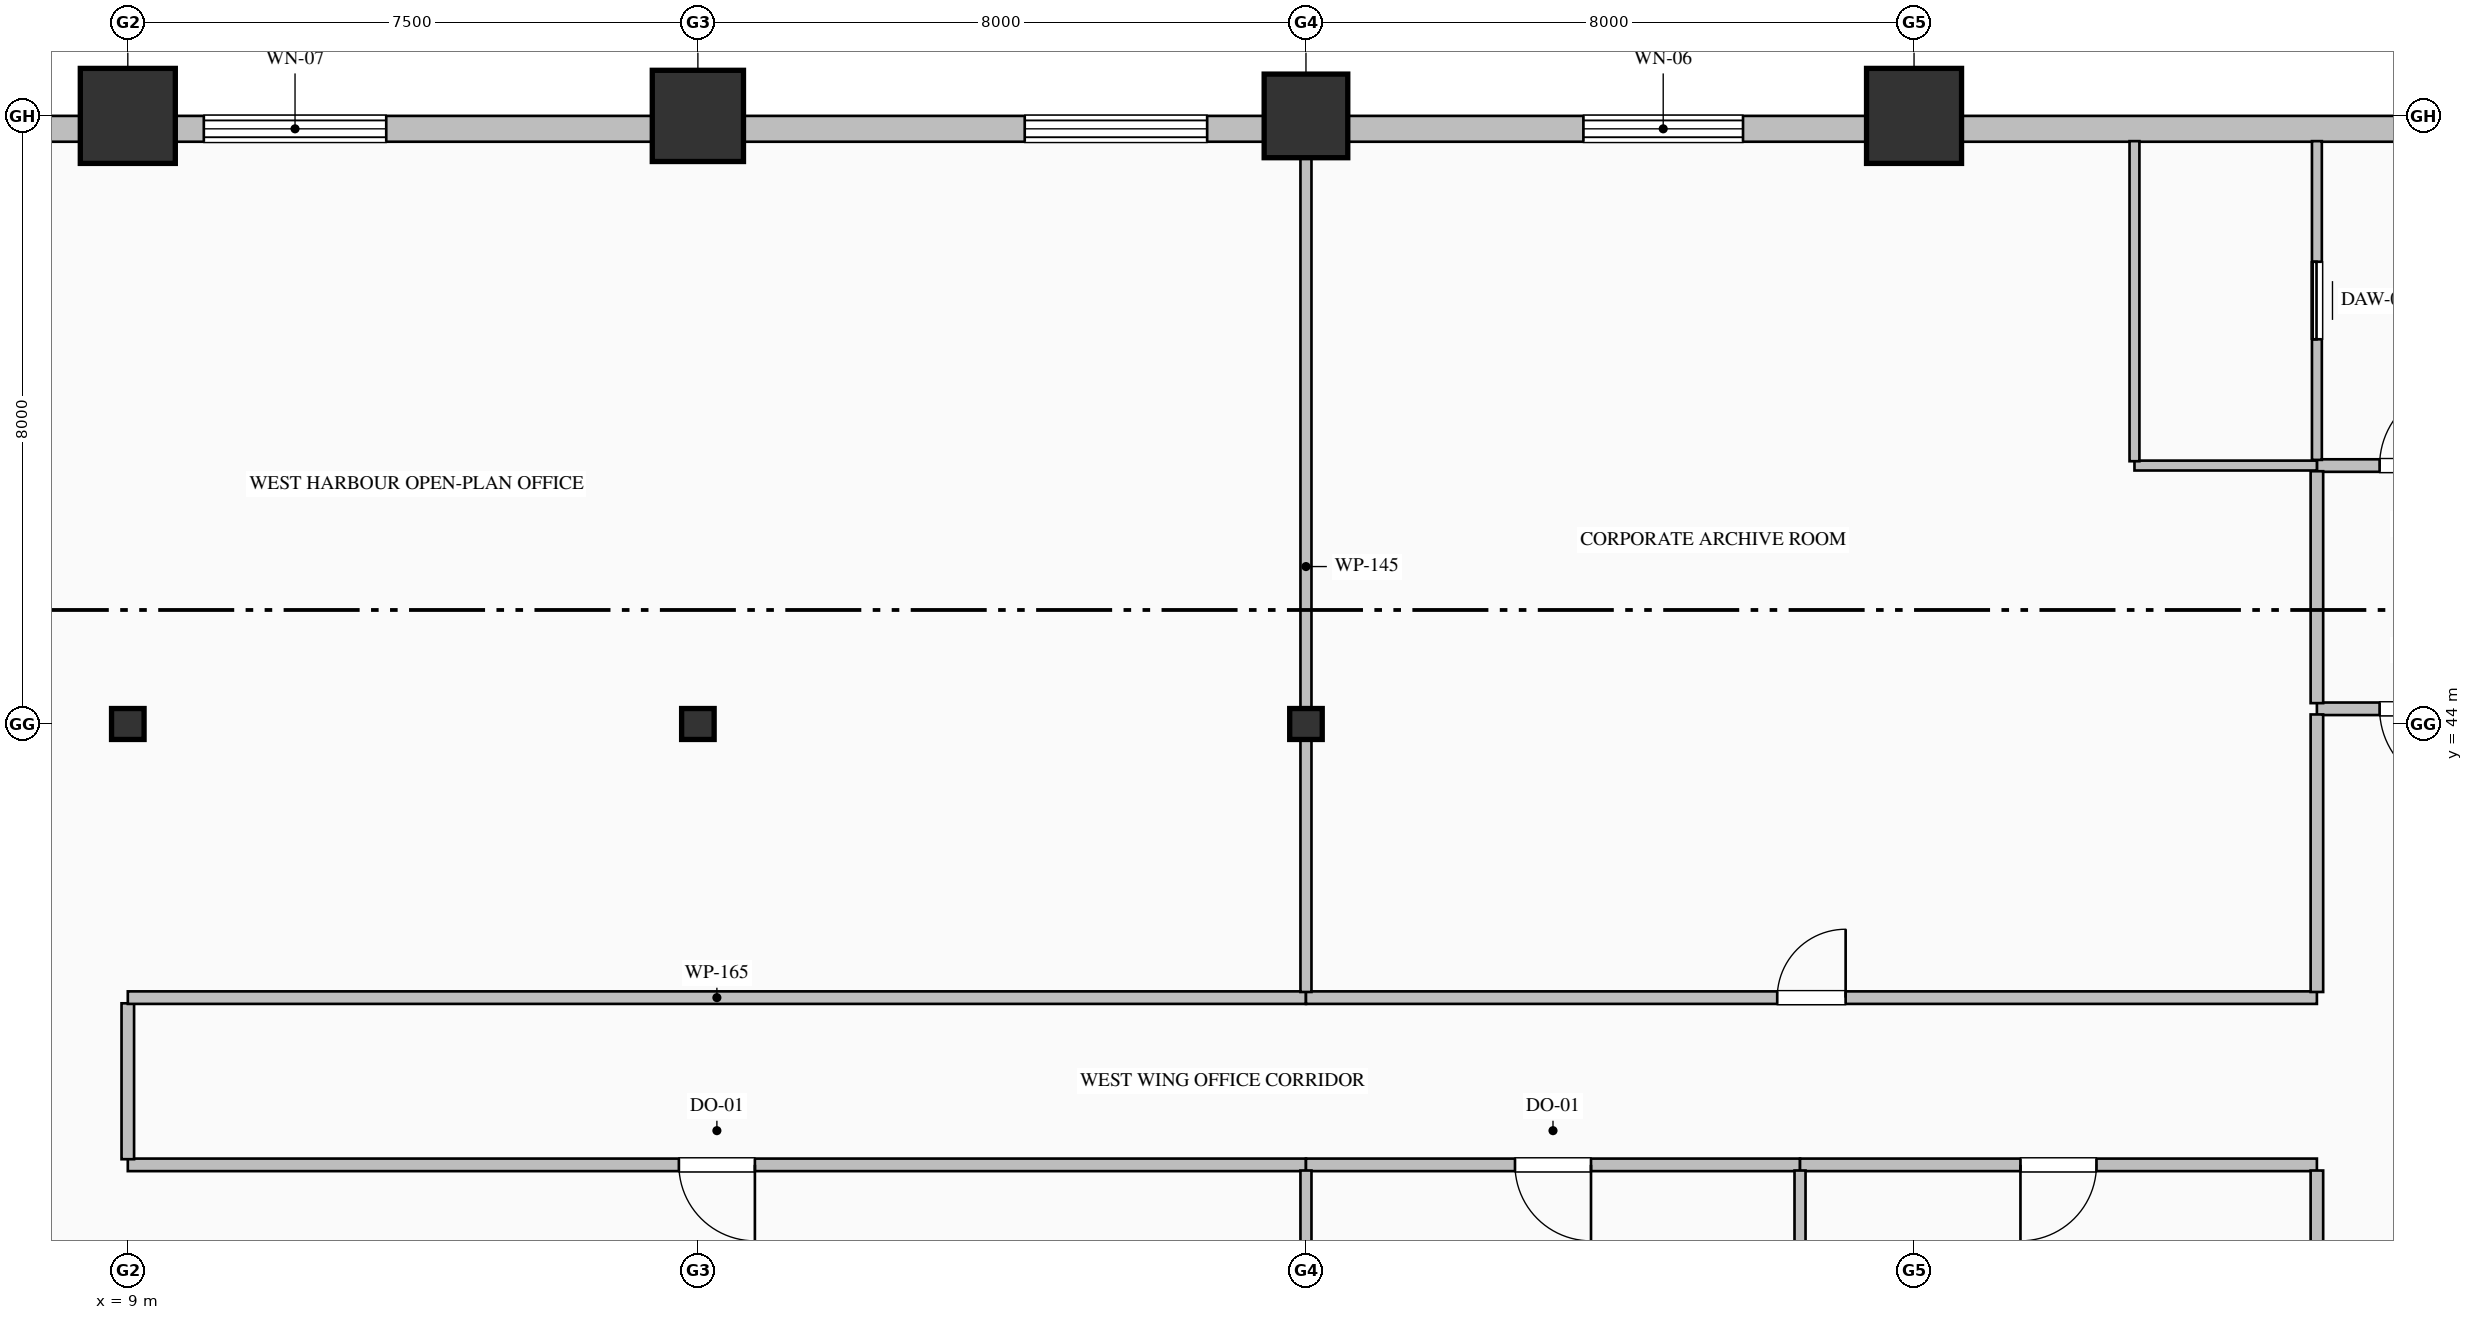
"""IFC4 building model, lengths in metres.
Left out: names, types, materials, properties, quantities, classifications, styles, units other than length and angle.
Written with IfcOpenShell. Run it as: python <this file> out.ifc"""

import sys

from ifc_helpers import new_model, si_unit, direction, frame, frame_2d, origin, origin_2d, place, context, subcontext, project, spatial, rectangle, hollow_rectangle, hollow_circle, i_section, extrude, element, fill, save


model = new_model("IFC4")
c1 = context("Model", 3, precision=1e-05, world=origin(), true_north=direction((0.0, 1.0)))
c2 = subcontext(c1, "Body", "Model", "MODEL_VIEW")
j1 = project(units=[si_unit("LENGTHUNIT", "METRE"), si_unit("PLANEANGLEUNIT", "RADIAN")], contexts=[c1])
p1 = place(None, origin())
s1 = spatial("IfcSite", under=j1, at=p1, CompositionType="ELEMENT")
p2 = place(p1, origin())
s2 = spatial("IfcBuilding", under=s1, at=p2, CompositionType="ELEMENT")
p3 = place(p2, frame((0.0, 0.0, 60.2)))
s3 = spatial("IfcBuildingStorey", under=s2, at=p3, CompositionType="ELEMENT", Elevation=60.2)
p4 = place(p3, frame((9.0, 44.0, 0.0), z_axis=(0.0, 0.0, 1.0), x_axis=(1.0, 0.0, 0.0)))
e1 = element("IfcColumn", 1, at=p4, inside=s3, PredefinedType="COLUMN", context=c2, shape_type="SweptSolid", body=[
    extrude(i_section(OverallWidth=0.407, OverallDepth=0.428, WebThickness=0.02, FlangeThickness=0.035, FilletRadius=0.022, at=origin_2d()), origin(), (0.0, 0.0, 1.0), 4.0),
])
p5 = place(p3, frame((9.0, 52.0, 0.0), z_axis=(0.0, 0.0, 1.0), x_axis=(1.0, 0.0, 0.0)))
e2 = element("IfcColumn", 2, at=p5, inside=s3, PredefinedType="COLUMN", context=c2, shape_type="SweptSolid", body=[
    extrude(hollow_rectangle(XDim=1.25, YDim=1.25, WallThickness=0.045, at=origin_2d()), origin(), (0.0, 0.0, 1.0), 4.0),
])
p6 = place(p3, frame((16.5, 44.0, 0.0), z_axis=(0.0, 0.0, 1.0), x_axis=(1.0, 0.0, 0.0)))
e3 = element("IfcColumn", 3, at=p6, inside=s3, PredefinedType="COLUMN", context=c2, shape_type="SweptSolid", body=[
    extrude(i_section(OverallWidth=0.407, OverallDepth=0.428, WebThickness=0.02, FlangeThickness=0.035, FilletRadius=0.022, at=origin_2d()), origin(), (0.0, 0.0, 1.0), 4.0),
])
p7 = place(p3, frame((16.5, 52.0, 0.0), z_axis=(0.0, 0.0, 1.0), x_axis=(1.0, 0.0, 0.0)))
e4 = element("IfcColumn", 4, at=p7, inside=s3, PredefinedType="COLUMN", context=c2, shape_type="SweptSolid", body=[
    extrude(hollow_circle(Radius=0.6, WallThickness=0.04, at=origin_2d()), origin(), (0.0, 0.0, 1.0), 4.0),
])
p8 = place(p3, frame((24.5, 44.0, 0.0), z_axis=(0.0, 0.0, 1.0), x_axis=(1.0, 0.0, 0.0)))
e5 = element("IfcColumn", 5, at=p8, inside=s3, PredefinedType="COLUMN", context=c2, shape_type="SweptSolid", body=[
    extrude(i_section(OverallWidth=0.407, OverallDepth=0.428, WebThickness=0.02, FlangeThickness=0.035, FilletRadius=0.022, at=origin_2d()), origin(), (0.0, 0.0, 1.0), 4.0),
])
p9 = place(p3, frame((24.5, 52.0, 0.0), z_axis=(0.0, 0.0, 1.0), x_axis=(1.0, 0.0, 0.0)))
e6 = element("IfcColumn", 6, at=p9, inside=s3, PredefinedType="COLUMN", context=c2, shape_type="SweptSolid", body=[
    extrude(hollow_rectangle(XDim=1.1, YDim=1.1, WallThickness=0.04, at=origin_2d()), origin(), (0.0, 0.0, 1.0), 4.0),
])
p10 = place(p3, frame((32.5, 52.0, 0.0), z_axis=(0.0, 0.0, 1.0), x_axis=(1.0, 0.0, 0.0)))
e7 = element("IfcColumn", 7, at=p10, inside=s3, PredefinedType="COLUMN", context=c2, shape_type="SweptSolid", body=[
    extrude(hollow_rectangle(XDim=1.25, YDim=1.25, WallThickness=0.045, at=origin_2d()), origin(), (0.0, 0.0, 1.0), 4.0),
])
p11 = place(p3, frame((4.0, 51.83, 0.0), z_axis=(0.0, 0.0, 1.0), x_axis=(1.0, 0.0, 0.0)))
e8 = element("IfcWall", 8, at=p11, inside=s3, PredefinedType="SOLIDWALL", context=c2, shape_type="SweptSolid", body=[
    extrude(rectangle(XDim=36.52, YDim=0.34, at=frame_2d((18.26, 0.0))), origin(), (0.0, 0.0, 1.0), 3.25),
])
p12 = place(p11, frame((6.0, 0.0, 0.8)))
e9 = element("IfcOpeningElement", 9, at=p12, cuts=e8, PredefinedType="OPENING", context=c2, shape_type="SweptSolid", body=[
    extrude(rectangle(XDim=2.4, YDim=2.15, at=frame_2d((1.2, 1.075))), frame((0.0, 0.18, 0.0), z_axis=(0.0, -1.0, 0.0), x_axis=(1.0, 0.0, 0.0)), (0.0, 0.0, 1.0), 0.36),
])
p13 = place(p11, frame((16.8, 0.0, 0.8)))
e10 = element("IfcOpeningElement", 10, at=p13, cuts=e8, PredefinedType="OPENING", context=c2, shape_type="SweptSolid", body=[
    extrude(rectangle(XDim=2.4, YDim=2.15, at=frame_2d((1.2, 1.075))), frame((0.0, 0.18, 0.0), z_axis=(0.0, -1.0, 0.0), x_axis=(1.0, 0.0, 0.0)), (0.0, 0.0, 1.0), 0.36),
])
p14 = place(p11, frame((24.15, 0.0, 0.85)))
e11 = element("IfcOpeningElement", 11, at=p14, cuts=e8, PredefinedType="OPENING", context=c2, shape_type="SweptSolid", body=[
    extrude(rectangle(XDim=2.1, YDim=2.05, at=frame_2d((1.05, 1.025))), frame((0.0, 0.18, 0.0), z_axis=(0.0, -1.0, 0.0), x_axis=(1.0, 0.0, 0.0)), (0.0, 0.0, 1.0), 0.36),
])
p15 = place(p3, frame((37.8, 47.4, 0.0), z_axis=(0.0, 0.0, 1.0), x_axis=(1.0, 0.0, 0.0)))
e12 = element("IfcWall", 12, at=p15, inside=s3, PredefinedType="PARTITIONING", context=c2, shape_type="SweptSolid", body=[
    extrude(rectangle(XDim=2.7, YDim=0.165, at=frame_2d((1.35, 0.0))), origin(), (0.0, 0.0, 1.0), 3.75),
])
p16 = place(p15, frame((0.825, 0.0, 0.0)))
e13 = element("IfcOpeningElement", 13, at=p16, cuts=e12, PredefinedType="OPENING", context=c2, shape_type="SweptSolid", body=[
    extrude(rectangle(XDim=1.05, YDim=2.15, at=frame_2d((0.525, 1.075))), frame((0.0, 0.093, 0.0), z_axis=(0.0, -1.0, 0.0), x_axis=(1.0, 0.0, 0.0)), (0.0, 0.0, 1.0), 0.185),
])
p17 = place(p3, frame((40.5, 44.2, 0.0), z_axis=(0.0, 0.0, 1.0), x_axis=(-1.0, 0.0, 0.0)))
e14 = element("IfcWall", 14, at=p17, inside=s3, PredefinedType="PARTITIONING", context=c2, shape_type="SweptSolid", body=[
    extrude(rectangle(XDim=2.7, YDim=0.165, at=frame_2d((1.35, 0.0))), origin(), (0.0, 0.0, 1.0), 3.75),
])
p18 = place(p17, frame((0.825, 0.0, 0.0)))
e15 = element("IfcOpeningElement", 15, at=p18, cuts=e14, PredefinedType="OPENING", context=c2, shape_type="SweptSolid", body=[
    extrude(rectangle(XDim=1.05, YDim=2.15, at=frame_2d((0.525, 1.075))), frame((0.0, 0.093, 0.0), z_axis=(0.0, -1.0, 0.0), x_axis=(1.0, 0.0, 0.0)), (0.0, 0.0, 1.0), 0.185),
])
p19 = place(p3, frame((37.8, 44.274, 0.0), z_axis=(0.0, 0.0, 1.0), x_axis=(0.0, 1.0, 0.0)))
e16 = element("IfcWall", 16, at=p19, inside=s3, PredefinedType="PARTITIONING", context=c2, shape_type="SweptSolid", body=[
    extrude(rectangle(XDim=3.051, YDim=0.165, at=frame_2d((1.525, 0.0))), origin(), (0.0, 0.0, 1.0), 3.75),
])
p20 = place(p3, frame((37.8, 47.475, 0.0), z_axis=(0.0, 0.0, 1.0), x_axis=(0.0, 1.0, 0.0)))
e17 = element("IfcWall", 17, at=p20, inside=s3, PredefinedType="PARTITIONING", context=c2, shape_type="SweptSolid", body=[
    extrude(rectangle(XDim=4.193, YDim=0.13, at=frame_2d((2.097, 0.0))), origin(), (0.0, 0.0, 1.0), 3.75),
])
p21 = place(p20, frame((1.587, 0.0, 0.0)))
e18 = element("IfcOpeningElement", 18, at=p21, cuts=e17, PredefinedType="OPENING", context=c2, shape_type="SweptSolid", body=[
    extrude(rectangle(XDim=1.02, YDim=2.15, at=frame_2d((0.51, 1.075))), frame((0.0, 0.075, 0.0), z_axis=(0.0, -1.0, 0.0), x_axis=(1.0, 0.0, 0.0)), (0.0, 0.0, 1.0), 0.15),
])
p22 = place(p3, frame((37.8, 47.4, 0.0), z_axis=(0.0, 0.0, 1.0), x_axis=(-1.0, 0.0, 0.0)))
e19 = element("IfcWall", 19, at=p22, inside=s3, PredefinedType="PARTITIONING", context=c2, shape_type="SweptSolid", body=[
    extrude(rectangle(XDim=2.4, YDim=0.13, at=frame_2d((1.2, 0.0))), origin(), (0.0, 0.0, 1.0), 3.75),
])
p23 = place(p3, frame((35.4, 47.457, 0.0), z_axis=(0.0, 0.0, 1.0), x_axis=(0.0, 1.0, 0.0)))
e20 = element("IfcWall", 20, at=p23, inside=s3, PredefinedType="PARTITIONING", context=c2, shape_type="SweptSolid", body=[
    extrude(rectangle(XDim=4.211, YDim=0.13, at=frame_2d((2.105, 0.0))), origin(), (0.0, 0.0, 1.0), 3.75),
])
p24 = place(p3, frame((24.5, 38.2, 0.0), z_axis=(0.0, 0.0, 1.0), x_axis=(-1.0, 0.0, 0.0)))
e21 = element("IfcWall", 21, at=p24, inside=s3, PredefinedType="PARTITIONING", context=c2, shape_type="SweptSolid", body=[
    extrude(rectangle(XDim=15.5, YDim=0.165, at=frame_2d((7.75, 0.0))), origin(), (0.0, 0.0, 1.0), 3.75),
])
p25 = place(p24, frame((7.25, 0.0, 0.0)))
e22 = element("IfcOpeningElement", 22, at=p25, cuts=e21, PredefinedType="OPENING", context=c2, shape_type="SweptSolid", body=[
    extrude(rectangle(XDim=1.0, YDim=2.15, at=frame_2d((0.5, 1.075))), frame((0.0, 0.093, 0.0), z_axis=(0.0, -1.0, 0.0), x_axis=(1.0, 0.0, 0.0)), (0.0, 0.0, 1.0), 0.185),
])
p26 = place(p3, frame((9.0, 38.274, 0.0), z_axis=(0.0, 0.0, 1.0), x_axis=(0.0, 1.0, 0.0)))
e23 = element("IfcWall", 23, at=p26, inside=s3, PredefinedType="PARTITIONING", context=c2, shape_type="SweptSolid", body=[
    extrude(rectangle(XDim=2.051, YDim=0.165, at=frame_2d((1.025, 0.0))), origin(), (0.0, 0.0, 1.0), 3.042),
])
p27 = place(p3, frame((9.0, 40.4, 0.0), z_axis=(0.0, 0.0, 1.0), x_axis=(1.0, 0.0, 0.0)))
e24 = element("IfcWall", 24, at=p27, inside=s3, PredefinedType="PARTITIONING", context=c2, shape_type="SweptSolid", body=[
    extrude(rectangle(XDim=15.5, YDim=0.165, at=frame_2d((7.75, 0.0))), origin(), (0.0, 0.0, 1.0), 3.75),
])
p28 = place(p3, frame((24.5, 40.4, 0.0), z_axis=(0.0, 0.0, 1.0), x_axis=(1.0, 0.0, 0.0)))
e25 = element("IfcWall", 25, at=p28, inside=s3, PredefinedType="PARTITIONING", context=c2, shape_type="SweptSolid", body=[
    extrude(rectangle(XDim=13.3, YDim=0.165, at=frame_2d((6.65, 0.0))), origin(), (0.0, 0.0, 1.0), 3.75),
])
p29 = place(p28, frame((6.2, 0.0, 0.0)))
e26 = element("IfcOpeningElement", 26, at=p29, cuts=e25, PredefinedType="OPENING", context=c2, shape_type="SweptSolid", body=[
    extrude(rectangle(XDim=0.9, YDim=2.15, at=frame_2d((0.45, 1.075))), frame((0.0, 0.093, 0.0), z_axis=(0.0, -1.0, 0.0), x_axis=(1.0, 0.0, 0.0)), (0.0, 0.0, 1.0), 0.185),
])
p30 = place(p3, frame((31.0, 38.2, 0.0), z_axis=(0.0, 0.0, 1.0), x_axis=(-1.0, 0.0, 0.0)))
e27 = element("IfcWall", 27, at=p30, inside=s3, PredefinedType="PARTITIONING", context=c2, shape_type="SweptSolid", body=[
    extrude(rectangle(XDim=6.5, YDim=0.165, at=frame_2d((3.25, 0.0))), origin(), (0.0, 0.0, 1.0), 3.75),
])
p31 = place(p30, frame((2.75, 0.0, 0.0)))
e28 = element("IfcOpeningElement", 28, at=p31, cuts=e27, PredefinedType="OPENING", context=c2, shape_type="SweptSolid", body=[
    extrude(rectangle(XDim=1.0, YDim=2.15, at=frame_2d((0.5, 1.075))), frame((0.0, 0.093, 0.0), z_axis=(0.0, -1.0, 0.0), x_axis=(1.0, 0.0, 0.0)), (0.0, 0.0, 1.0), 0.185),
])
p32 = place(p3, frame((37.8, 38.2, 0.0), z_axis=(0.0, 0.0, 1.0), x_axis=(-1.0, 0.0, 0.0)))
e29 = element("IfcWall", 29, at=p32, inside=s3, PredefinedType="PARTITIONING", context=c2, shape_type="SweptSolid", body=[
    extrude(rectangle(XDim=6.8, YDim=0.165, at=frame_2d((3.4, 0.0))), origin(), (0.0, 0.0, 1.0), 3.75),
])
p33 = place(p32, frame((2.9, 0.0, 0.0)))
e30 = element("IfcOpeningElement", 30, at=p33, cuts=e29, PredefinedType="OPENING", context=c2, shape_type="SweptSolid", body=[
    extrude(rectangle(XDim=1.0, YDim=2.15, at=frame_2d((0.5, 1.075))), frame((0.0, 0.093, 0.0), z_axis=(0.0, -1.0, 0.0), x_axis=(1.0, 0.0, 0.0)), (0.0, 0.0, 1.0), 0.185),
])
p34 = place(p3, frame((37.8, 40.475, 0.0), z_axis=(0.0, 0.0, 1.0), x_axis=(0.0, 1.0, 0.0)))
e31 = element("IfcWall", 31, at=p34, inside=s3, PredefinedType="PARTITIONING", context=c2, shape_type="SweptSolid", body=[
    extrude(rectangle(XDim=3.651, YDim=0.165, at=frame_2d((1.825, 0.0))), origin(), (0.0, 0.0, 1.0), 3.75),
])
p35 = place(p3, frame((37.8, 31.6, 0.0), z_axis=(0.0, 0.0, 1.0), x_axis=(0.0, 1.0, 0.0)))
e32 = element("IfcWall", 32, at=p35, inside=s3, PredefinedType="PARTITIONING", context=c2, shape_type="SweptSolid", body=[
    extrude(rectangle(XDim=6.525, YDim=0.165, at=frame_2d((3.263, 0.0))), origin(), (0.0, 0.0, 1.0), 3.75),
])
p36 = place(p3, frame((24.5, 51.668, 0.0), z_axis=(0.0, 0.0, 1.0), x_axis=(0.0, -1.0, 0.0)))
e33 = element("IfcWall", 33, at=p36, inside=s3, PredefinedType="PARTITIONING", context=c2, shape_type="SweptSolid", body=[
    extrude(rectangle(XDim=11.193, YDim=0.145, at=frame_2d((5.597, 0.0))), origin(), (0.0, 0.0, 1.0), 3.042),
])
p37 = place(p3, frame((24.5, 38.125, 0.0), z_axis=(0.0, 0.0, 1.0), x_axis=(0.0, -1.0, 0.0)))
e34 = element("IfcWall", 34, at=p37, inside=s3, PredefinedType="PARTITIONING", context=c2, shape_type="SweptSolid", body=[
    extrude(rectangle(XDim=9.793, YDim=0.145, at=frame_2d((4.897, 0.0))), origin(), (0.0, 0.0, 1.0), 3.042),
])
p38 = place(p3, frame((31.0, 38.125, 0.0), z_axis=(0.0, 0.0, 1.0), x_axis=(0.0, -1.0, 0.0)))
e35 = element("IfcWall", 35, at=p38, inside=s3, PredefinedType="PARTITIONING", context=c2, shape_type="SweptSolid", body=[
    extrude(rectangle(XDim=9.793, YDim=0.145, at=frame_2d((4.897, 0.0))), origin(), (0.0, 0.0, 1.0), 3.75),
])
p39 = place(p12, origin())
e36 = element("IfcWindow", 36, at=p39, inside=s3, PartitioningType="TRIPLE_PANEL_VERTICAL", PredefinedType="WINDOW", context=c2, shape_type="SweptSolid", body=[
    extrude(rectangle(XDim=2.4, YDim=2.15, at=frame_2d((1.2, 1.075))), frame((0.0, 0.15, 0.0), z_axis=(0.0, -1.0, 0.0), x_axis=(1.0, 0.0, 0.0)), (0.0, 0.0, 1.0), 0.06),
])
fill(e9, e36)
p40 = place(p13, origin())
e37 = element("IfcWindow", 37, at=p40, inside=s3, PartitioningType="TRIPLE_PANEL_VERTICAL", PredefinedType="WINDOW", context=c2, shape_type="SweptSolid", body=[
    extrude(rectangle(XDim=2.4, YDim=2.15, at=frame_2d((1.2, 1.075))), frame((0.0, 0.15, 0.0), z_axis=(0.0, -1.0, 0.0), x_axis=(1.0, 0.0, 0.0)), (0.0, 0.0, 1.0), 0.06),
])
fill(e10, e37)
p41 = place(p14, origin())
e38 = element("IfcWindow", 38, at=p41, inside=s3, PartitioningType="TRIPLE_PANEL_VERTICAL", PredefinedType="WINDOW", context=c2, shape_type="SweptSolid", body=[
    extrude(rectangle(XDim=2.1, YDim=2.05, at=frame_2d((1.05, 1.025))), frame((0.0, 0.15, 0.0), z_axis=(0.0, -1.0, 0.0), x_axis=(1.0, 0.0, 0.0)), (0.0, 0.0, 1.0), 0.06),
])
fill(e11, e38)
p42 = place(p16, origin())
e39 = element("IfcDoor", 39, at=p42, inside=s3, OperationType="SINGLE_SWING_RIGHT", PredefinedType="DOOR", context=c2, shape_type="SweptSolid", body=[
    extrude(rectangle(XDim=1.05, YDim=2.15, at=frame_2d((0.525, 1.075))), frame((0.0, 0.025, 0.0), z_axis=(0.0, -1.0, 0.0), x_axis=(1.0, 0.0, 0.0)), (0.0, 0.0, 1.0), 0.05),
])
fill(e13, e39)
p43 = place(p18, origin())
e40 = element("IfcDoor", 40, at=p43, inside=s3, OperationType="SINGLE_SWING_LEFT", PredefinedType="DOOR", context=c2, shape_type="SweptSolid", body=[
    extrude(rectangle(XDim=1.05, YDim=2.15, at=frame_2d((0.525, 1.075))), frame((0.0, 0.025, 0.0), z_axis=(0.0, -1.0, 0.0), x_axis=(1.0, 0.0, 0.0)), (0.0, 0.0, 1.0), 0.05),
])
fill(e15, e40)
p44 = place(p21, origin())
e41 = element("IfcDoor", 41, at=p44, inside=s3, OperationType="SLIDING_TO_LEFT", PredefinedType="DOOR", context=c2, shape_type="SweptSolid", body=[
    extrude(rectangle(XDim=1.02, YDim=2.15, at=frame_2d((0.51, 1.075))), frame((0.0, 0.025, 0.0), z_axis=(0.0, -1.0, 0.0), x_axis=(1.0, 0.0, 0.0)), (0.0, 0.0, 1.0), 0.05),
])
fill(e18, e41)
p45 = place(p25, origin())
e42 = element("IfcDoor", 42, at=p45, inside=s3, OperationType="SINGLE_SWING_LEFT", PredefinedType="DOOR", context=c2, shape_type="SweptSolid", body=[
    extrude(rectangle(XDim=1.0, YDim=2.15, at=frame_2d((0.5, 1.075))), frame((0.0, 0.025, 0.0), z_axis=(0.0, -1.0, 0.0), x_axis=(1.0, 0.0, 0.0)), (0.0, 0.0, 1.0), 0.05),
])
fill(e22, e42)
p46 = place(p29, origin())
e43 = element("IfcDoor", 43, at=p46, inside=s3, OperationType="SINGLE_SWING_RIGHT", PredefinedType="DOOR", context=c2, shape_type="SweptSolid", body=[
    extrude(rectangle(XDim=0.9, YDim=2.15, at=frame_2d((0.45, 1.075))), frame((0.0, 0.025, 0.0), z_axis=(0.0, -1.0, 0.0), x_axis=(1.0, 0.0, 0.0)), (0.0, 0.0, 1.0), 0.05),
])
fill(e26, e43)
p47 = place(p31, origin())
e44 = element("IfcDoor", 44, at=p47, inside=s3, OperationType="SINGLE_SWING_LEFT", PredefinedType="DOOR", context=c2, shape_type="SweptSolid", body=[
    extrude(rectangle(XDim=1.0, YDim=2.15, at=frame_2d((0.5, 1.075))), frame((0.0, 0.025, 0.0), z_axis=(0.0, -1.0, 0.0), x_axis=(1.0, 0.0, 0.0)), (0.0, 0.0, 1.0), 0.05),
])
fill(e28, e44)
p48 = place(p33, origin())
e45 = element("IfcDoor", 45, at=p48, inside=s3, OperationType="SINGLE_SWING_RIGHT", PredefinedType="DOOR", context=c2, shape_type="SweptSolid", body=[
    extrude(rectangle(XDim=1.0, YDim=2.15, at=frame_2d((0.5, 1.075))), frame((0.0, 0.025, 0.0), z_axis=(0.0, -1.0, 0.0), x_axis=(1.0, 0.0, 0.0)), (0.0, 0.0, 1.0), 0.05),
])
fill(e30, e45)
save(model, sys.argv[1])
